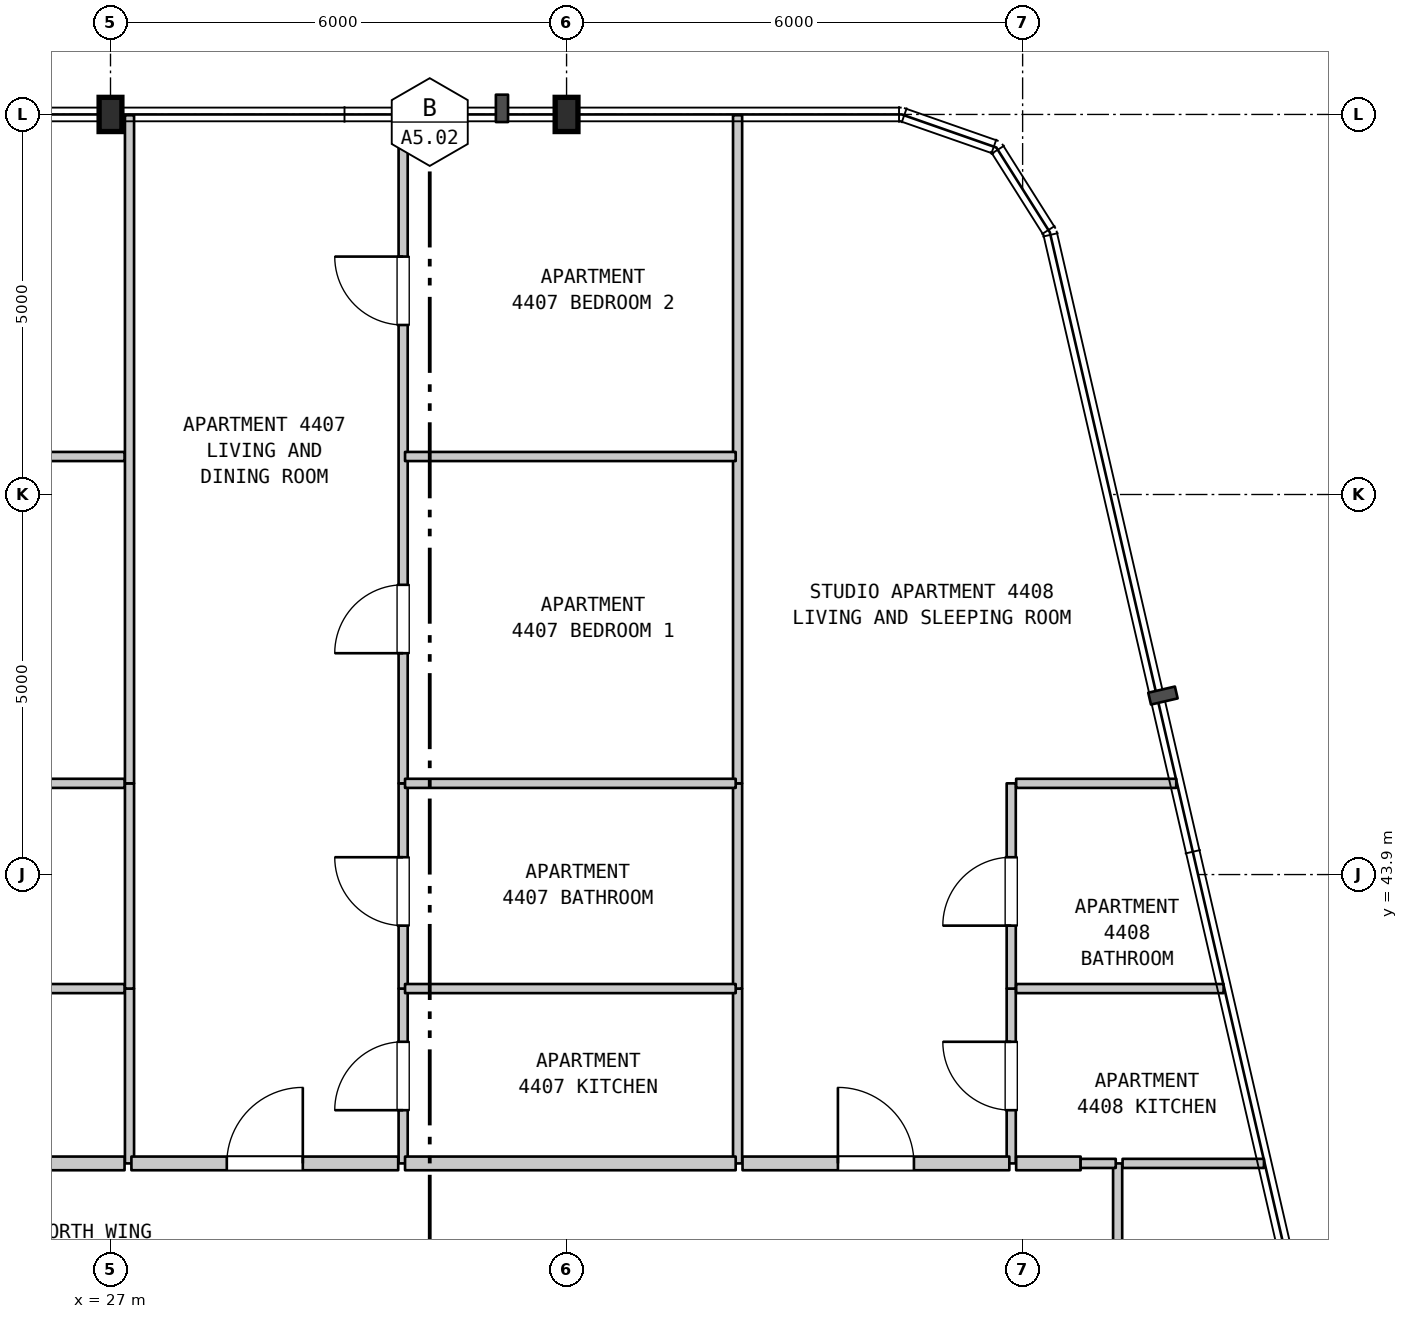
"""IFC4 building model, lengths in metres.
Left out: names, types, materials, properties, quantities, classifications, styles, units other than length and angle.
Written with IfcOpenShell. Run it as: python <this file> out.ifc"""

import sys

from ifc_helpers import new_model, si_unit, direction, frame, frame_2d, origin, origin_2d, place, context, subcontext, project, spatial, rectangle, i_section, extrude, element, fill, save


model = new_model("IFC4")
c1 = context("Model", 3, precision=1e-05, world=origin(), true_north=direction((0.0, 1.0)))
c2 = subcontext(c1, "Body", "Model", "MODEL_VIEW")
j1 = project(units=[si_unit("LENGTHUNIT", "METRE"), si_unit("PLANEANGLEUNIT", "RADIAN")], contexts=[c1])
p1 = place(None, origin())
s1 = spatial("IfcSite", under=j1, at=p1, CompositionType="ELEMENT")
p2 = place(p1, origin())
s2 = spatial("IfcBuilding", under=s1, at=p2, CompositionType="ELEMENT")
p3 = place(p2, frame((0.0, 0.0, 180.2)))
s3 = spatial("IfcBuildingStorey", under=s2, at=p3, CompositionType="ELEMENT", Elevation=180.2)
for number, where, z_axis, x_axis in (
    (1, (27.0, 53.9, 0.0), (0.0, 0.0, 1.0), (1.0, 0.0, 0.0)),
    (2, (33.0, 53.9, 0.0), (0.0, 0.0, 1.0), (1.0, 0.0, 0.0)),
):
    element("IfcColumn", number, at=place(p3, frame(where, z_axis=z_axis, x_axis=x_axis)), inside=s3, PredefinedType="COLUMN", context=c2, shape_type="SweptSolid", body=[
        extrude(i_section(OverallWidth=0.3, OverallDepth=0.45, WebThickness=0.014, FlangeThickness=0.026, FilletRadius=0.027, at=origin_2d()), origin(), (0.0, 0.0, 1.0), 3.7),
    ])
p4 = place(p3, frame((27.25, 40.1, 0.0), z_axis=(0.0, 0.0, 1.0), x_axis=(0.0, 1.0, 0.0)))
e3 = element("IfcWall", 3, at=p4, inside=s3, PredefinedType="PARTITIONING", context=c2, shape_type="SweptSolid", body=[
    extrude(rectangle(XDim=2.3, YDim=0.12, at=frame_2d((1.15, 0.0))), origin(), (0.0, 0.0, 1.0), 3.38),
])
p5 = place(p3, frame((27.25, 42.4, 0.0), z_axis=(0.0, 0.0, 1.0), x_axis=(0.0, 1.0, 0.0)))
e4 = element("IfcWall", 4, at=p5, inside=s3, PredefinedType="PARTITIONING", context=c2, shape_type="SweptSolid", body=[
    extrude(rectangle(XDim=2.7, YDim=0.12, at=frame_2d((1.35, 0.0))), origin(), (0.0, 0.0, 1.0), 3.38),
])
p6 = place(p3, frame((27.25, 45.1, 0.0), z_axis=(0.0, 0.0, 1.0), x_axis=(0.0, 1.0, 0.0)))
e5 = element("IfcWall", 5, at=p6, inside=s3, PredefinedType="PARTITIONING", context=c2, shape_type="SweptSolid", body=[
    extrude(rectangle(XDim=8.79, YDim=0.12, at=frame_2d((4.395, 0.0))), origin(), (0.0, 0.0, 1.0), 3.38),
])
p7 = place(p3, frame((30.85, 40.1, 0.0), z_axis=(0.0, 0.0, 1.0), x_axis=(0.0, 1.0, 0.0)))
e6 = element("IfcWall", 6, at=p7, inside=s3, PredefinedType="PARTITIONING", context=c2, shape_type="SweptSolid", body=[
    extrude(rectangle(XDim=2.3, YDim=0.12, at=frame_2d((1.15, 0.0))), origin(), (0.0, 0.0, 1.0), 3.38),
])
p8 = place(p7, frame((0.7, 0.0, 0.0)))
e7 = element("IfcOpeningElement", 7, at=p8, cuts=e6, PredefinedType="OPENING", context=c2, shape_type="SweptSolid", body=[
    extrude(rectangle(XDim=0.9, YDim=2.15, at=frame_2d((0.45, 1.075))), frame((0.0, 0.07, 0.0), z_axis=(0.0, -1.0, 0.0), x_axis=(1.0, 0.0, 0.0)), (0.0, 0.0, 1.0), 0.14),
])
p9 = place(p3, frame((30.85, 42.4, 0.0), z_axis=(0.0, 0.0, 1.0), x_axis=(0.0, 1.0, 0.0)))
e8 = element("IfcWall", 8, at=p9, inside=s3, PredefinedType="PARTITIONING", context=c2, shape_type="SweptSolid", body=[
    extrude(rectangle(XDim=2.7, YDim=0.12, at=frame_2d((1.35, 0.0))), origin(), (0.0, 0.0, 1.0), 3.38),
])
p10 = place(p9, frame((0.828, 0.0, 0.0)))
e9 = element("IfcOpeningElement", 9, at=p10, cuts=e8, PredefinedType="OPENING", context=c2, shape_type="SweptSolid", body=[
    extrude(rectangle(XDim=0.9, YDim=2.1, at=frame_2d((0.45, 1.05))), frame((0.0, 0.07, 0.0), z_axis=(0.0, -1.0, 0.0), x_axis=(1.0, 0.0, 0.0)), (0.0, 0.0, 1.0), 0.14),
])
p11 = place(p3, frame((30.85, 45.1, 0.0), z_axis=(0.0, 0.0, 1.0), x_axis=(0.0, 1.0, 0.0)))
e10 = element("IfcWall", 10, at=p11, inside=s3, PredefinedType="PARTITIONING", context=c2, shape_type="SweptSolid", body=[
    extrude(rectangle(XDim=8.79, YDim=0.12, at=frame_2d((4.395, 0.0))), origin(), (0.0, 0.0, 1.0), 3.38),
])
p12 = place(p11, frame((1.712, 0.0, 0.0)))
e11 = element("IfcOpeningElement", 11, at=p12, cuts=e10, PredefinedType="OPENING", context=c2, shape_type="SweptSolid", body=[
    extrude(rectangle(XDim=0.9, YDim=2.15, at=frame_2d((0.45, 1.075))), frame((0.0, 0.07, 0.0), z_axis=(0.0, -1.0, 0.0), x_axis=(1.0, 0.0, 0.0)), (0.0, 0.0, 1.0), 0.14),
])
p13 = place(p11, frame((6.03, 0.0, 0.0)))
e12 = element("IfcOpeningElement", 12, at=p13, cuts=e10, PredefinedType="OPENING", context=c2, shape_type="SweptSolid", body=[
    extrude(rectangle(XDim=0.9, YDim=2.15, at=frame_2d((0.45, 1.075))), frame((0.0, 0.07, 0.0), z_axis=(0.0, -1.0, 0.0), x_axis=(1.0, 0.0, 0.0)), (0.0, 0.0, 1.0), 0.14),
])
p14 = place(p3, frame((35.25, 40.1, 0.0), z_axis=(0.0, 0.0, 1.0), x_axis=(0.0, 1.0, 0.0)))
e13 = element("IfcWall", 13, at=p14, inside=s3, PredefinedType="PARTITIONING", context=c2, shape_type="SweptSolid", body=[
    extrude(rectangle(XDim=2.3, YDim=0.12, at=frame_2d((1.15, 0.0))), origin(), (0.0, 0.0, 1.0), 3.38),
])
p15 = place(p3, frame((35.25, 42.4, 0.0), z_axis=(0.0, 0.0, 1.0), x_axis=(0.0, 1.0, 0.0)))
e14 = element("IfcWall", 14, at=p15, inside=s3, PredefinedType="PARTITIONING", context=c2, shape_type="SweptSolid", body=[
    extrude(rectangle(XDim=2.7, YDim=0.12, at=frame_2d((1.35, 0.0))), origin(), (0.0, 0.0, 1.0), 3.38),
])
p16 = place(p3, frame((35.25, 45.1, 0.0), z_axis=(0.0, 0.0, 1.0), x_axis=(0.0, 1.0, 0.0)))
e15 = element("IfcWall", 15, at=p16, inside=s3, PredefinedType="PARTITIONING", context=c2, shape_type="SweptSolid", body=[
    extrude(rectangle(XDim=8.79, YDim=0.12, at=frame_2d((4.395, 0.0))), origin(), (0.0, 0.0, 1.0), 3.38),
])
p17 = place(p3, frame((38.85, 40.1, 0.0), z_axis=(0.0, 0.0, 1.0), x_axis=(0.0, 1.0, 0.0)))
e16 = element("IfcWall", 16, at=p17, inside=s3, PredefinedType="PARTITIONING", context=c2, shape_type="SweptSolid", body=[
    extrude(rectangle(XDim=2.3, YDim=0.12, at=frame_2d((1.15, 0.0))), origin(), (0.0, 0.0, 1.0), 3.38),
])
p18 = place(p17, frame((0.7, 0.0, 0.0)))
e17 = element("IfcOpeningElement", 17, at=p18, cuts=e16, PredefinedType="OPENING", context=c2, shape_type="SweptSolid", body=[
    extrude(rectangle(XDim=0.9, YDim=2.15, at=frame_2d((0.45, 1.075))), frame((0.0, 0.07, 0.0), z_axis=(0.0, -1.0, 0.0), x_axis=(1.0, 0.0, 0.0)), (0.0, 0.0, 1.0), 0.14),
])
p19 = place(p3, frame((38.85, 42.4, 0.0), z_axis=(0.0, 0.0, 1.0), x_axis=(0.0, 1.0, 0.0)))
e18 = element("IfcWall", 18, at=p19, inside=s3, PredefinedType="PARTITIONING", context=c2, shape_type="SweptSolid", body=[
    extrude(rectangle(XDim=2.7, YDim=0.12, at=frame_2d((1.35, 0.0))), origin(), (0.0, 0.0, 1.0), 3.38),
])
p20 = place(p19, frame((0.828, 0.0, 0.0)))
e19 = element("IfcOpeningElement", 19, at=p20, cuts=e18, PredefinedType="OPENING", context=c2, shape_type="SweptSolid", body=[
    extrude(rectangle(XDim=0.9, YDim=2.1, at=frame_2d((0.45, 1.05))), frame((0.0, 0.07, 0.0), z_axis=(0.0, -1.0, 0.0), x_axis=(1.0, 0.0, 0.0)), (0.0, 0.0, 1.0), 0.14),
])
p21 = place(p3, frame((40.25, 37.9, 0.0), z_axis=(0.0, 0.0, 1.0), x_axis=(0.0, 1.0, 0.0)))
e20 = element("IfcWall", 20, at=p21, inside=s3, PredefinedType="PARTITIONING", context=c2, shape_type="SweptSolid", body=[
    extrude(rectangle(XDim=2.2, YDim=0.12, at=frame_2d((1.1, 0.0))), origin(), (0.0, 0.0, 1.0), 3.38),
])
p22 = place(p3, frame((22.195, 40.1, 0.0), z_axis=(0.0, 0.0, 1.0), x_axis=(1.0, 0.0, 0.0)))
e21 = element("IfcWall", 21, at=p22, inside=s3, PredefinedType="STANDARD", context=c2, shape_type="SweptSolid", body=[
    extrude(rectangle(XDim=4.99, YDim=0.18, at=frame_2d((2.495, 0.0))), origin(), (0.0, 0.0, 1.0), 3.38),
])
p23 = place(p3, frame((27.275, 40.1, 0.0), z_axis=(0.0, 0.0, 1.0), x_axis=(1.0, 0.0, 0.0)))
e22 = element("IfcWall", 22, at=p23, inside=s3, PredefinedType="STANDARD", context=c2, shape_type="SweptSolid", body=[
    extrude(rectangle(XDim=3.51, YDim=0.18, at=frame_2d((1.755, 0.0))), origin(), (0.0, 0.0, 1.0), 3.38),
])
p24 = place(p23, frame((1.255, 0.0, 0.0)))
e23 = element("IfcOpeningElement", 23, at=p24, cuts=e22, PredefinedType="OPENING", context=c2, shape_type="SweptSolid", body=[
    extrude(rectangle(XDim=1.0, YDim=2.15, at=frame_2d((0.5, 1.075))), frame((0.0, 0.1, 0.0), z_axis=(0.0, -1.0, 0.0), x_axis=(1.0, 0.0, 0.0)), (0.0, 0.0, 1.0), 0.2),
])
p25 = place(p3, frame((30.875, 40.1, 0.0), z_axis=(0.0, 0.0, 1.0), x_axis=(1.0, 0.0, 0.0)))
e24 = element("IfcWall", 24, at=p25, inside=s3, PredefinedType="STANDARD", context=c2, shape_type="SweptSolid", body=[
    extrude(rectangle(XDim=4.35, YDim=0.18, at=frame_2d((2.175, 0.0))), origin(), (0.0, 0.0, 1.0), 3.38),
])
p26 = place(p3, frame((35.315, 40.1, 0.0), z_axis=(0.0, 0.0, 1.0), x_axis=(1.0, 0.0, 0.0)))
e25 = element("IfcWall", 25, at=p26, inside=s3, PredefinedType="STANDARD", context=c2, shape_type="SweptSolid", body=[
    extrude(rectangle(XDim=3.51, YDim=0.18, at=frame_2d((1.755, 0.0))), origin(), (0.0, 0.0, 1.0), 3.38),
])
p27 = place(p26, frame((1.255, 0.0, 0.0)))
e26 = element("IfcOpeningElement", 26, at=p27, cuts=e25, PredefinedType="OPENING", context=c2, shape_type="SweptSolid", body=[
    extrude(rectangle(XDim=1.0, YDim=2.15, at=frame_2d((0.5, 1.075))), frame((0.0, 0.1, 0.0), z_axis=(0.0, -1.0, 0.0), x_axis=(1.0, 0.0, 0.0)), (0.0, 0.0, 1.0), 0.2),
])
p28 = place(p3, frame((38.915, 40.1, 0.0), z_axis=(0.0, 0.0, 1.0), x_axis=(1.0, 0.0, 0.0)))
e27 = element("IfcWall", 27, at=p28, inside=s3, PredefinedType="STANDARD", context=c2, shape_type="SweptSolid", body=[
    extrude(rectangle(XDim=0.848, YDim=0.18, at=frame_2d((0.424, 0.0))), origin(), (0.0, 0.0, 1.0), 3.38),
])
p29 = place(p3, frame((39.763, 40.1, 0.0), z_axis=(0.0, 0.0, 1.0), x_axis=(1.0, 0.0, 0.0)))
e28 = element("IfcWall", 28, at=p29, inside=s3, PredefinedType="PARTITIONING", context=c2, shape_type="SweptSolid", body=[
    extrude(rectangle(XDim=0.462, YDim=0.12, at=frame_2d((0.231, 0.0))), origin(), (0.0, 0.0, 1.0), 3.38),
])
p30 = place(p3, frame((40.315, 40.1, 0.0), z_axis=(0.0, 0.0, 1.0), x_axis=(1.0, 0.0, 0.0)))
e29 = element("IfcWall", 29, at=p30, inside=s3, PredefinedType="PARTITIONING", context=c2, shape_type="SweptSolid", body=[
    extrude(rectangle(XDim=1.86, YDim=0.12, at=frame_2d((0.93, 0.0))), origin(), (0.0, 0.0, 1.0), 3.38),
])
p31 = place(p3, frame((22.195, 42.4, 0.0), z_axis=(0.0, 0.0, 1.0), x_axis=(1.0, 0.0, 0.0)))
e30 = element("IfcWall", 30, at=p31, inside=s3, PredefinedType="PARTITIONING", context=c2, shape_type="SweptSolid", body=[
    extrude(rectangle(XDim=4.99, YDim=0.12, at=frame_2d((2.495, 0.0))), origin(), (0.0, 0.0, 1.0), 3.38),
])
p32 = place(p3, frame((30.875, 42.4, 0.0), z_axis=(0.0, 0.0, 1.0), x_axis=(1.0, 0.0, 0.0)))
e31 = element("IfcWall", 31, at=p32, inside=s3, PredefinedType="PARTITIONING", context=c2, shape_type="SweptSolid", body=[
    extrude(rectangle(XDim=4.35, YDim=0.12, at=frame_2d((2.175, 0.0))), origin(), (0.0, 0.0, 1.0), 3.38),
])
p33 = place(p3, frame((38.915, 42.4, 0.0), z_axis=(0.0, 0.0, 1.0), x_axis=(1.0, 0.0, 0.0)))
e32 = element("IfcWall", 32, at=p33, inside=s3, PredefinedType="PARTITIONING", context=c2, shape_type="SweptSolid", body=[
    extrude(rectangle(XDim=2.729, YDim=0.12, at=frame_2d((1.365, 0.0))), origin(), (0.0, 0.0, 1.0), 3.38),
])
p34 = place(p3, frame((22.195, 45.1, 0.0), z_axis=(0.0, 0.0, 1.0), x_axis=(1.0, 0.0, 0.0)))
e33 = element("IfcWall", 33, at=p34, inside=s3, PredefinedType="PARTITIONING", context=c2, shape_type="SweptSolid", body=[
    extrude(rectangle(XDim=4.99, YDim=0.12, at=frame_2d((2.495, 0.0))), origin(), (0.0, 0.0, 1.0), 3.38),
])
p35 = place(p3, frame((30.875, 45.1, 0.0), z_axis=(0.0, 0.0, 1.0), x_axis=(1.0, 0.0, 0.0)))
e34 = element("IfcWall", 34, at=p35, inside=s3, PredefinedType="PARTITIONING", context=c2, shape_type="SweptSolid", body=[
    extrude(rectangle(XDim=4.35, YDim=0.12, at=frame_2d((2.175, 0.0))), origin(), (0.0, 0.0, 1.0), 3.38),
])
p36 = place(p3, frame((38.915, 45.1, 0.0), z_axis=(0.0, 0.0, 1.0), x_axis=(1.0, 0.0, 0.0)))
e35 = element("IfcWall", 35, at=p36, inside=s3, PredefinedType="PARTITIONING", context=c2, shape_type="SweptSolid", body=[
    extrude(rectangle(XDim=2.106, YDim=0.12, at=frame_2d((1.053, 0.0))), origin(), (0.0, 0.0, 1.0), 3.38),
])
p37 = place(p3, frame((22.195, 49.4, 0.0), z_axis=(0.0, 0.0, 1.0), x_axis=(1.0, 0.0, 0.0)))
e36 = element("IfcWall", 36, at=p37, inside=s3, PredefinedType="PARTITIONING", context=c2, shape_type="SweptSolid", body=[
    extrude(rectangle(XDim=4.99, YDim=0.12, at=frame_2d((2.495, 0.0))), origin(), (0.0, 0.0, 1.0), 3.38),
])
p38 = place(p3, frame((30.875, 49.4, 0.0), z_axis=(0.0, 0.0, 1.0), x_axis=(1.0, 0.0, 0.0)))
e37 = element("IfcWall", 37, at=p38, inside=s3, PredefinedType="PARTITIONING", context=c2, shape_type="SweptSolid", body=[
    extrude(rectangle(XDim=4.35, YDim=0.12, at=frame_2d((2.175, 0.0))), origin(), (0.0, 0.0, 1.0), 3.38),
])
p39 = place(p8, origin())
e38 = element("IfcDoor", 38, at=p39, inside=s3, OperationType="SINGLE_SWING_LEFT", PredefinedType="DOOR", context=c2, shape_type="SweptSolid", body=[
    extrude(rectangle(XDim=0.9, YDim=2.15, at=frame_2d((0.45, 1.075))), frame((0.0, 0.025, 0.0), z_axis=(0.0, -1.0, 0.0), x_axis=(1.0, 0.0, 0.0)), (0.0, 0.0, 1.0), 0.05),
])
fill(e7, e38)
p40 = place(p10, origin())
e39 = element("IfcDoor", 39, at=p40, inside=s3, OperationType="SINGLE_SWING_RIGHT", PredefinedType="DOOR", context=c2, shape_type="SweptSolid", body=[
    extrude(rectangle(XDim=0.9, YDim=2.1, at=frame_2d((0.45, 1.05))), frame((0.0, 0.025, 0.0), z_axis=(0.0, -1.0, 0.0), x_axis=(1.0, 0.0, 0.0)), (0.0, 0.0, 1.0), 0.05),
])
fill(e9, e39)
p41 = place(p12, origin())
e40 = element("IfcDoor", 40, at=p41, inside=s3, OperationType="SINGLE_SWING_LEFT", PredefinedType="DOOR", context=c2, shape_type="SweptSolid", body=[
    extrude(rectangle(XDim=0.9, YDim=2.15, at=frame_2d((0.45, 1.075))), frame((0.0, 0.025, 0.0), z_axis=(0.0, -1.0, 0.0), x_axis=(1.0, 0.0, 0.0)), (0.0, 0.0, 1.0), 0.05),
])
fill(e11, e40)
p42 = place(p13, origin())
e41 = element("IfcDoor", 41, at=p42, inside=s3, OperationType="SINGLE_SWING_RIGHT", PredefinedType="DOOR", context=c2, shape_type="SweptSolid", body=[
    extrude(rectangle(XDim=0.9, YDim=2.15, at=frame_2d((0.45, 1.075))), frame((0.0, 0.025, 0.0), z_axis=(0.0, -1.0, 0.0), x_axis=(1.0, 0.0, 0.0)), (0.0, 0.0, 1.0), 0.05),
])
fill(e12, e41)
p43 = place(p18, origin())
e42 = element("IfcDoor", 42, at=p43, inside=s3, OperationType="SINGLE_SWING_RIGHT", PredefinedType="DOOR", context=c2, shape_type="SweptSolid", body=[
    extrude(rectangle(XDim=0.9, YDim=2.15, at=frame_2d((0.45, 1.075))), frame((0.0, 0.025, 0.0), z_axis=(0.0, -1.0, 0.0), x_axis=(1.0, 0.0, 0.0)), (0.0, 0.0, 1.0), 0.05),
])
fill(e17, e42)
p44 = place(p20, origin())
e43 = element("IfcDoor", 43, at=p44, inside=s3, OperationType="SINGLE_SWING_LEFT", PredefinedType="DOOR", context=c2, shape_type="SweptSolid", body=[
    extrude(rectangle(XDim=0.9, YDim=2.1, at=frame_2d((0.45, 1.05))), frame((0.0, 0.025, 0.0), z_axis=(0.0, -1.0, 0.0), x_axis=(1.0, 0.0, 0.0)), (0.0, 0.0, 1.0), 0.05),
])
fill(e19, e43)
p45 = place(p24, origin())
e44 = element("IfcDoor", 44, at=p45, inside=s3, OperationType="SINGLE_SWING_RIGHT", PredefinedType="DOOR", context=c2, shape_type="SweptSolid", body=[
    extrude(rectangle(XDim=1.0, YDim=2.15, at=frame_2d((0.5, 1.075))), frame((0.0, 0.025, 0.0), z_axis=(0.0, -1.0, 0.0), x_axis=(1.0, 0.0, 0.0)), (0.0, 0.0, 1.0), 0.05),
])
fill(e23, e44)
p46 = place(p27, origin())
e45 = element("IfcDoor", 45, at=p46, inside=s3, OperationType="SINGLE_SWING_LEFT", PredefinedType="DOOR", context=c2, shape_type="SweptSolid", body=[
    extrude(rectangle(XDim=1.0, YDim=2.15, at=frame_2d((0.5, 1.075))), frame((0.0, 0.025, 0.0), z_axis=(0.0, -1.0, 0.0), x_axis=(1.0, 0.0, 0.0)), (0.0, 0.0, 1.0), 0.05),
])
fill(e26, e45)
save(model, sys.argv[1])
